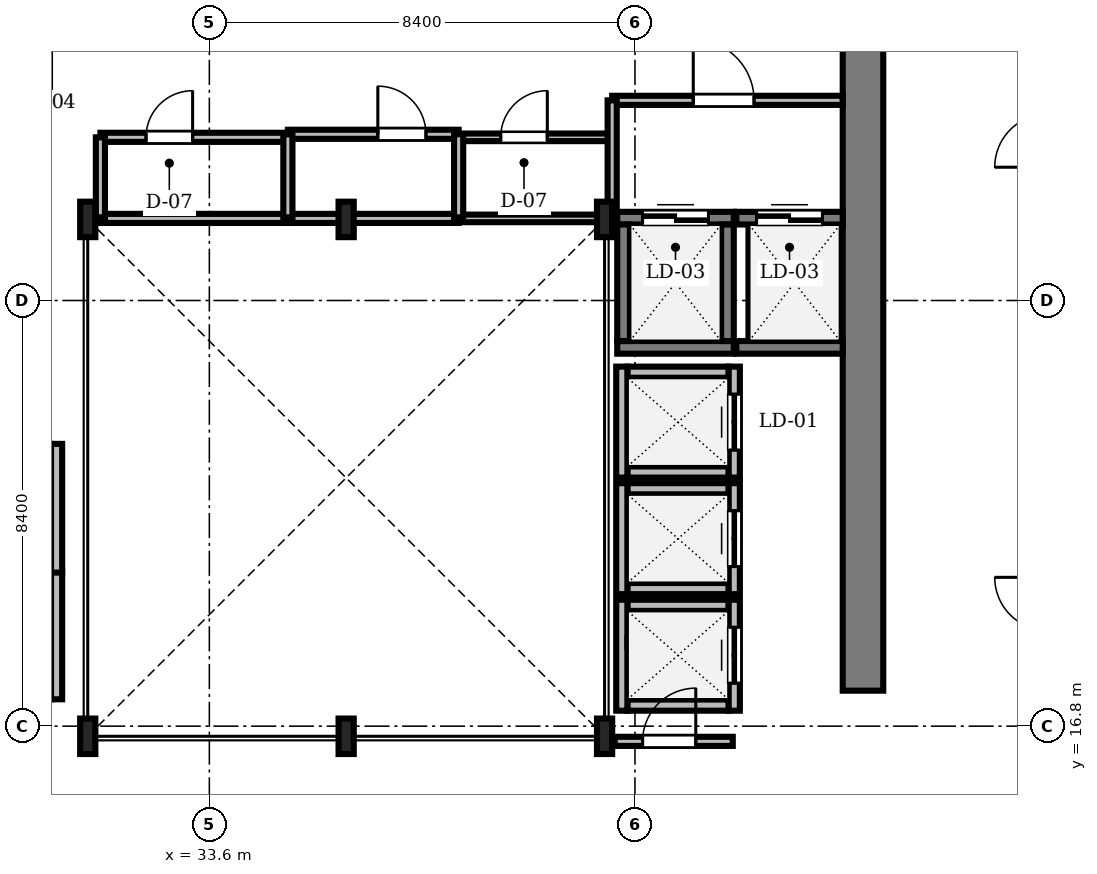
"""IFC4 building model, lengths in metres.
Left out: names, types, materials, properties, quantities, classifications, styles, units other than length and angle.
Written with IfcOpenShell. Run it as: python <this file> out.ifc"""

import sys

from ifc_helpers import new_model, si_unit, direction, frame, frame_2d, origin, origin_2d, place, context, subcontext, project, spatial, rectangle, i_section, extrude, source, transform, mapped, element, fill, save


model = new_model("IFC4")
c1 = context("Model", 3, precision=1e-05, world=origin(), true_north=direction((0.0, 1.0)))
c2 = subcontext(c1, "Body", "Model", "MODEL_VIEW")
j1 = project(units=[si_unit("LENGTHUNIT", "METRE"), si_unit("PLANEANGLEUNIT", "RADIAN")], contexts=[c1])
p1 = place(None, origin())
s1 = spatial("IfcSite", under=j1, at=p1, CompositionType="ELEMENT")
p2 = place(p1, origin())
s2 = spatial("IfcBuilding", under=s1, at=p2, CompositionType="ELEMENT")
p3 = place(p2, frame((0.0, 0.0, 207.3)))
s3 = spatial("IfcBuildingStorey", under=s2, at=p3, CompositionType="ELEMENT", Elevation=207.3)
m1 = source(origin(), c2, "Body", "SweptSolid", [
    extrude(rectangle(XDim=13.15, YDim=0.8, at=frame_2d((6.575, 0.0))), origin(), (0.0, 0.0, 1.0), 3.53),
])
p4 = place(p3, frame((46.5, 17.5, 0.0), z_axis=(0.0, 0.0, 1.0), x_axis=(0.0, 1.0, 0.0)))
e1 = element("IfcWall", 1, at=p4, inside=s3, PredefinedType="SHEAR", context=c2, shape_type="MappedRepresentation", body=[
    mapped(m1, transform((0.0, 0.0, 0.0), scale=1.0)),
])
m2 = source(origin(), c2, "Body", "SweptSolid", [
    extrude(i_section(OverallWidth=0.3, OverallDepth=0.7, WebThickness=0.017, FlangeThickness=0.032, FilletRadius=0.027, at=origin_2d()), origin(), (0.0, 0.0, 1.0), 3.53),
])
for number, where, z_axis, x_axis in (
    (2, (31.2, 16.6, 0.0), (0.0, 0.0, 1.0), (1.0, 0.0, 0.0)),
    (3, (36.3, 16.6, 0.0), (0.0, 0.0, 1.0), (1.0, 0.0, 0.0)),
    (4, (41.4, 16.6, 0.0), (0.0, 0.0, 1.0), (1.0, 0.0, 0.0)),
    (5, (41.4, 26.8, 0.0), (0.0, 0.0, 1.0), (1.0, 0.0, 0.0)),
    (6, (36.3, 26.8, 0.0), (0.0, 0.0, 1.0), (1.0, 0.0, 0.0)),
    (7, (31.2, 26.8, 0.0), (0.0, 0.0, 1.0), (1.0, 0.0, 0.0)),
):
    element("IfcColumn", number, at=place(p3, frame(where, z_axis=z_axis, x_axis=x_axis)), inside=s3, PredefinedType="COLUMN", context=c2, shape_type="MappedRepresentation", body=[
        mapped(m2, transform((0.0, 0.0, 0.0), scale=1.0)),
    ])
m3 = source(origin(), c2, "Body", "SweptSolid", [
    extrude(rectangle(XDim=2.0, YDim=0.22, at=frame_2d((1.0, 0.0))), origin(), (0.0, 0.0, 1.0), 3.53),
])
for number, where, z_axis, x_axis in (
    (8, (41.85, 21.815, 0.0), (0.0, 0.0, 1.0), (1.0, 0.0, 0.0)),
    (9, (41.85, 23.785, 0.0), (0.0, 0.0, 1.0), (1.0, 0.0, 0.0)),
):
    element("IfcWall", number, at=place(p3, frame(where, z_axis=z_axis, x_axis=x_axis)), inside=s3, PredefinedType="SOLIDWALL", context=c2, shape_type="MappedRepresentation", body=[
        mapped(m3, transform((0.0, 0.0, 0.0), scale=1.0)),
    ])
m4 = source(origin(), c2, "Body", "SweptSolid", [
    extrude(rectangle(XDim=2.19, YDim=0.22, at=frame_2d((1.095, 0.0))), origin(), (0.0, 0.0, 1.0), 3.53),
])
p5 = place(p3, frame((41.74, 21.705, 0.0), z_axis=(0.0, 0.0, 1.0), x_axis=(0.0, 1.0, 0.0)))
e10 = element("IfcWall", 10, at=p5, inside=s3, PredefinedType="SOLIDWALL", context=c2, shape_type="MappedRepresentation", body=[
    mapped(m4, transform((0.0, 0.0, 0.0), scale=1.0)),
])
p6 = place(p3, frame((43.96, 21.705, 0.0), z_axis=(0.0, 0.0, 1.0), x_axis=(0.0, 1.0, 0.0)))
e11 = element("IfcWall", 11, at=p6, inside=s3, PredefinedType="SOLIDWALL", context=c2, shape_type="MappedRepresentation", body=[
    mapped(m4, transform((0.0, 0.0, 0.0), scale=1.0)),
])
m5 = source(origin(), c2, "Body", "SweptSolid", [
    extrude(rectangle(XDim=1.1, YDim=2.2, at=frame_2d((0.55, 1.1))), frame((0.0, 0.12, 0.0), z_axis=(0.0, -1.0, 0.0), x_axis=(1.0, 0.0, 0.0)), (0.0, 0.0, 1.0), 0.24),
])
p7 = place(p6, frame((0.545, 0.0, 0.0)))
e12 = element("IfcOpeningElement", 12, at=p7, cuts=e11, PredefinedType="OPENING", context=c2, shape_type="MappedRepresentation", body=[
    mapped(m5, transform((0.0, 0.0, 0.0), scale=1.0)),
])
for number, where, z_axis, x_axis in (
    (13, (41.85, 19.515, 0.0), (0.0, 0.0, 1.0), (1.0, 0.0, 0.0)),
    (14, (41.85, 21.485, 0.0), (0.0, 0.0, 1.0), (1.0, 0.0, 0.0)),
):
    element("IfcWall", number, at=place(p3, frame(where, z_axis=z_axis, x_axis=x_axis)), inside=s3, PredefinedType="SOLIDWALL", context=c2, shape_type="MappedRepresentation", body=[
        mapped(m3, transform((0.0, 0.0, 0.0), scale=1.0)),
    ])
p8 = place(p3, frame((41.74, 19.405, 0.0), z_axis=(0.0, 0.0, 1.0), x_axis=(0.0, 1.0, 0.0)))
e15 = element("IfcWall", 15, at=p8, inside=s3, PredefinedType="SOLIDWALL", context=c2, shape_type="MappedRepresentation", body=[
    mapped(m4, transform((0.0, 0.0, 0.0), scale=1.0)),
])
p9 = place(p3, frame((43.96, 19.405, 0.0), z_axis=(0.0, 0.0, 1.0), x_axis=(0.0, 1.0, 0.0)))
e16 = element("IfcWall", 16, at=p9, inside=s3, PredefinedType="SOLIDWALL", context=c2, shape_type="MappedRepresentation", body=[
    mapped(m4, transform((0.0, 0.0, 0.0), scale=1.0)),
])
p10 = place(p9, frame((0.545, 0.0, 0.0)))
e17 = element("IfcOpeningElement", 17, at=p10, cuts=e16, PredefinedType="OPENING", context=c2, shape_type="MappedRepresentation", body=[
    mapped(m5, transform((0.0, 0.0, 0.0), scale=1.0)),
])
for number, where, z_axis, x_axis in (
    (18, (41.85, 17.215, 0.0), (0.0, 0.0, 1.0), (1.0, 0.0, 0.0)),
    (19, (41.85, 19.185, 0.0), (0.0, 0.0, 1.0), (1.0, 0.0, 0.0)),
):
    element("IfcWall", number, at=place(p3, frame(where, z_axis=z_axis, x_axis=x_axis)), inside=s3, PredefinedType="SOLIDWALL", context=c2, shape_type="MappedRepresentation", body=[
        mapped(m3, transform((0.0, 0.0, 0.0), scale=1.0)),
    ])
p11 = place(p3, frame((41.74, 17.105, 0.0), z_axis=(0.0, 0.0, 1.0), x_axis=(0.0, 1.0, 0.0)))
e20 = element("IfcWall", 20, at=p11, inside=s3, PredefinedType="SOLIDWALL", context=c2, shape_type="MappedRepresentation", body=[
    mapped(m4, transform((0.0, 0.0, 0.0), scale=1.0)),
])
p12 = place(p3, frame((43.96, 17.105, 0.0), z_axis=(0.0, 0.0, 1.0), x_axis=(0.0, 1.0, 0.0)))
e21 = element("IfcWall", 21, at=p12, inside=s3, PredefinedType="SOLIDWALL", context=c2, shape_type="MappedRepresentation", body=[
    mapped(m4, transform((0.0, 0.0, 0.0), scale=1.0)),
])
p13 = place(p12, frame((0.545, 0.0, 0.0)))
e22 = element("IfcOpeningElement", 22, at=p13, cuts=e21, PredefinedType="OPENING", context=c2, shape_type="MappedRepresentation", body=[
    mapped(m5, transform((0.0, 0.0, 0.0), scale=1.0)),
])
m6 = source(origin(), c2, "Body", "SweptSolid", [
    extrude(rectangle(XDim=2.54, YDim=0.22, at=frame_2d((1.27, 0.0))), origin(), (0.0, 0.0, 1.0), 3.53),
])
for number, where, z_axis, x_axis in (
    (23, (30.585, 17.33, 0.0), (0.0, 0.0, 1.0), (0.0, 1.0, 0.0)),
    (24, (30.585, 19.83, 0.0), (0.0, 0.0, 1.0), (0.0, 1.0, 0.0)),
):
    element("IfcWall", number, at=place(p3, frame(where, z_axis=z_axis, x_axis=x_axis)), inside=s3, PredefinedType="SOLIDWALL", context=c2, shape_type="MappedRepresentation", body=[
        mapped(m6, transform((0.0, 0.0, 0.0), scale=1.0)),
    ])
m7 = source(origin(), c2, "Body", "SweptSolid", [
    extrude(rectangle(XDim=2.3, YDim=0.25, at=frame_2d((1.15, 0.0))), origin(), (0.0, 0.0, 1.0), 3.53),
])
p14 = place(p3, frame((41.65, 24.275, 0.0), z_axis=(0.0, 0.0, 1.0), x_axis=(1.0, 0.0, 0.0)))
e25 = element("IfcWall", 25, at=p14, inside=s3, PredefinedType="SOLIDWALL", context=c2, shape_type="MappedRepresentation", body=[
    mapped(m7, transform((0.0, 0.0, 0.0), scale=1.0)),
])
p15 = place(p3, frame((41.65, 26.825, 0.0), z_axis=(0.0, 0.0, 1.0), x_axis=(1.0, 0.0, 0.0)))
e26 = element("IfcWall", 26, at=p15, inside=s3, PredefinedType="SOLIDWALL", context=c2, shape_type="MappedRepresentation", body=[
    mapped(m7, transform((0.0, 0.0, 0.0), scale=1.0)),
])
m8 = source(origin(), c2, "Body", "SweptSolid", [
    extrude(rectangle(XDim=1.3, YDim=2.3, at=frame_2d((0.65, 1.15))), frame((0.0, 0.135, 0.0), z_axis=(0.0, -1.0, 0.0), x_axis=(1.0, 0.0, 0.0)), (0.0, 0.0, 1.0), 0.27),
])
p16 = place(p15, frame((0.5, 0.0, 0.0)))
e27 = element("IfcOpeningElement", 27, at=p16, cuts=e26, PredefinedType="OPENING", context=c2, shape_type="MappedRepresentation", body=[
    mapped(m8, transform((0.0, 0.0, 0.0), scale=1.0)),
])
for number, where, z_axis, x_axis in (
    (28, (41.775, 24.4, 0.0), (0.0, 0.0, 1.0), (0.0, 1.0, 0.0)),
    (29, (43.825, 24.4, 0.0), (0.0, 0.0, 1.0), (0.0, 1.0, 0.0)),
):
    element("IfcWall", number, at=place(p3, frame(where, z_axis=z_axis, x_axis=x_axis)), inside=s3, PredefinedType="SOLIDWALL", context=c2, shape_type="MappedRepresentation", body=[
        mapped(m7, transform((0.0, 0.0, 0.0), scale=1.0)),
    ])
m9 = source(origin(), c2, "Body", "SweptSolid", [
    extrude(rectangle(XDim=2.1, YDim=0.25, at=frame_2d((1.05, 0.0))), origin(), (0.0, 0.0, 1.0), 3.53),
])
p17 = place(p3, frame((44.0, 24.275, 0.0), z_axis=(0.0, 0.0, 1.0), x_axis=(1.0, 0.0, 0.0)))
e30 = element("IfcWall", 30, at=p17, inside=s3, PredefinedType="SOLIDWALL", context=c2, shape_type="MappedRepresentation", body=[
    mapped(m9, transform((0.0, 0.0, 0.0), scale=1.0)),
])
p18 = place(p3, frame((44.0, 26.825, 0.0), z_axis=(0.0, 0.0, 1.0), x_axis=(1.0, 0.0, 0.0)))
e31 = element("IfcWall", 31, at=p18, inside=s3, PredefinedType="SOLIDWALL", context=c2, shape_type="MappedRepresentation", body=[
    mapped(m9, transform((0.0, 0.0, 0.0), scale=1.0)),
])
p19 = place(p18, frame((0.4, 0.0, 0.0)))
e32 = element("IfcOpeningElement", 32, at=p19, cuts=e31, PredefinedType="OPENING", context=c2, shape_type="MappedRepresentation", body=[
    mapped(m8, transform((0.0, 0.0, 0.0), scale=1.0)),
])
m10 = source(origin(), c2, "Body", "SweptSolid", [
    extrude(rectangle(XDim=4.548, YDim=0.18, at=frame_2d((2.274, 0.0))), origin(), (0.0, 0.0, 1.0), 3.162),
])
p20 = place(p3, frame((41.55, 29.15, 0.0), z_axis=(0.0, 0.0, 1.0), x_axis=(1.0, 0.0, 0.0)))
e33 = element("IfcWall", 33, at=p20, inside=s3, PredefinedType="PARTITIONING", context=c2, shape_type="MappedRepresentation", body=[
    mapped(m10, transform((0.0, 0.0, 0.0), scale=1.0)),
])
m11 = source(origin(), c2, "Body", "SweptSolid", [
    extrude(rectangle(XDim=1.2, YDim=2.2, at=frame_2d((0.6, 1.1))), frame((0.0, 0.1, 0.0), z_axis=(0.0, -1.0, 0.0), x_axis=(1.0, 0.0, 0.0)), (0.0, 0.0, 1.0), 0.2),
])
p21 = place(p20, frame((1.6, 0.0, 0.0)))
e34 = element("IfcOpeningElement", 34, at=p21, cuts=e33, PredefinedType="OPENING", context=c2, shape_type="MappedRepresentation", body=[
    mapped(m11, transform((0.0, 0.0, 0.0), scale=1.0)),
])
m12 = source(origin(), c2, "Body", "SweptSolid", [
    extrude(rectangle(XDim=3.7, YDim=0.18, at=frame_2d((1.85, 0.0))), origin(), (0.0, 0.0, 1.0), 3.162),
])
p22 = place(p3, frame((31.45, 28.42, 0.0), z_axis=(0.0, 0.0, 1.0), x_axis=(1.0, 0.0, 0.0)))
e35 = element("IfcWall", 35, at=p22, inside=s3, PredefinedType="PARTITIONING", context=c2, shape_type="MappedRepresentation", body=[
    mapped(m12, transform((0.0, 0.0, 0.0), scale=1.0)),
])
m13 = source(origin(), c2, "Body", "SweptSolid", [
    extrude(rectangle(XDim=0.92, YDim=2.1, at=frame_2d((0.46, 1.05))), frame((0.0, 0.1, 0.0), z_axis=(0.0, -1.0, 0.0), x_axis=(1.0, 0.0, 0.0)), (0.0, 0.0, 1.0), 0.2),
])
p23 = place(p22, frame((0.9, 0.0, 0.0)))
e36 = element("IfcOpeningElement", 36, at=p23, cuts=e35, PredefinedType="OPENING", context=c2, shape_type="MappedRepresentation", body=[
    mapped(m13, transform((0.0, 0.0, 0.0), scale=1.0)),
])
m14 = source(origin(), c2, "Body", "SweptSolid", [
    extrude(rectangle(XDim=3.37, YDim=0.18, at=frame_2d((1.685, 0.0))), origin(), (0.0, 0.0, 1.0), 3.53),
])
p24 = place(p3, frame((35.15, 28.48, 0.0), z_axis=(0.0, 0.0, 1.0), x_axis=(1.0, 0.0, 0.0)))
e37 = element("IfcWall", 37, at=p24, inside=s3, PredefinedType="PARTITIONING", context=c2, shape_type="MappedRepresentation", body=[
    mapped(m14, transform((0.0, 0.0, 0.0), scale=1.0)),
])
m15 = source(origin(), c2, "Body", "SweptSolid", [
    extrude(rectangle(XDim=0.95, YDim=2.15, at=frame_2d((0.475, 1.075))), frame((0.0, 0.1, 0.0), z_axis=(0.0, -1.0, 0.0), x_axis=(1.0, 0.0, 0.0)), (0.0, 0.0, 1.0), 0.2),
])
p25 = place(p24, frame((1.775, 0.0, 0.0)))
e38 = element("IfcOpeningElement", 38, at=p25, cuts=e37, PredefinedType="OPENING", context=c2, shape_type="MappedRepresentation", body=[
    mapped(m15, transform((0.0, 0.0, 0.0), scale=1.0)),
])
m16 = source(origin(), c2, "Body", "SweptSolid", [
    extrude(rectangle(XDim=3.0, YDim=0.15, at=frame_2d((1.5, 0.0))), origin(), (0.0, 0.0, 1.0), 3.53),
])
p26 = place(p3, frame((38.52, 28.42, 0.0), z_axis=(0.0, 0.0, 1.0), x_axis=(1.0, 0.0, 0.0)))
e39 = element("IfcWall", 39, at=p26, inside=s3, PredefinedType="PARTITIONING", context=c2, shape_type="MappedRepresentation", body=[
    mapped(m16, transform((0.0, 0.0, 0.0), scale=1.0)),
])
m17 = source(origin(), c2, "Body", "SweptSolid", [
    extrude(rectangle(XDim=0.92, YDim=2.1, at=frame_2d((0.46, 1.05))), frame((0.0, 0.085, 0.0), z_axis=(0.0, -1.0, 0.0), x_axis=(1.0, 0.0, 0.0)), (0.0, 0.0, 1.0), 0.17),
])
p27 = place(p26, frame((0.83, 0.0, 0.0)))
e40 = element("IfcOpeningElement", 40, at=p27, cuts=e39, PredefinedType="OPENING", context=c2, shape_type="MappedRepresentation", body=[
    mapped(m17, transform((0.0, 0.0, 0.0), scale=1.0)),
])
m18 = source(origin(), c2, "Body", "SweptSolid", [
    extrude(rectangle(XDim=2.33, YDim=0.18, at=frame_2d((1.165, 0.0))), origin(), (0.0, 0.0, 1.0), 2.972),
])
p28 = place(p3, frame((41.6, 16.5, 0.0), z_axis=(0.0, 0.0, 1.0), x_axis=(1.0, 0.0, 0.0)))
e41 = element("IfcWall", 41, at=p28, inside=s3, PredefinedType="PARTITIONING", context=c2, shape_type="MappedRepresentation", body=[
    mapped(m18, transform((0.0, 0.0, 0.0), scale=1.0)),
])
m19 = source(origin(), c2, "Body", "SweptSolid", [
    extrude(rectangle(XDim=1.05, YDim=2.2, at=frame_2d((0.525, 1.1))), frame((0.0, 0.1, 0.0), z_axis=(0.0, -1.0, 0.0), x_axis=(1.0, 0.0, 0.0)), (0.0, 0.0, 1.0), 0.2),
])
p29 = place(p28, frame((0.55, 0.0, 0.0)))
e42 = element("IfcOpeningElement", 42, at=p29, cuts=e41, PredefinedType="OPENING", context=c2, shape_type="MappedRepresentation", body=[
    mapped(m19, transform((0.0, 0.0, 0.0), scale=1.0)),
])
m20 = source(origin(), c2, "Body", "SweptSolid", [
    extrude(rectangle(XDim=3.7, YDim=0.18, at=frame_2d((1.85, 0.0))), origin(), (0.0, 0.0, 1.0), 3.072),
])
p30 = place(p3, frame((31.45, 26.82, 0.0), z_axis=(0.0, 0.0, 1.0), x_axis=(1.0, 0.0, 0.0)))
e43 = element("IfcWall", 43, at=p30, inside=s3, PredefinedType="PARTITIONING", context=c2, shape_type="MappedRepresentation", body=[
    mapped(m20, transform((0.0, 0.0, 0.0), scale=1.0)),
])
m21 = source(origin(), c2, "Body", "SweptSolid", [
    extrude(rectangle(XDim=3.37, YDim=0.18, at=frame_2d((1.685, 0.0))), origin(), (0.0, 0.0, 1.0), 3.072),
])
p31 = place(p3, frame((35.15, 26.82, 0.0), z_axis=(0.0, 0.0, 1.0), x_axis=(1.0, 0.0, 0.0)))
e44 = element("IfcWall", 44, at=p31, inside=s3, PredefinedType="PARTITIONING", context=c2, shape_type="MappedRepresentation", body=[
    mapped(m21, transform((0.0, 0.0, 0.0), scale=1.0)),
])
m22 = source(origin(), c2, "Body", "SweptSolid", [
    extrude(rectangle(XDim=3.0, YDim=0.15, at=frame_2d((1.5, 0.0))), origin(), (0.0, 0.0, 1.0), 2.972),
])
p32 = place(p3, frame((38.52, 26.82, 0.0), z_axis=(0.0, 0.0, 1.0), x_axis=(1.0, 0.0, 0.0)))
e45 = element("IfcWall", 45, at=p32, inside=s3, PredefinedType="PARTITIONING", context=c2, shape_type="MappedRepresentation", body=[
    mapped(m22, transform((0.0, 0.0, 0.0), scale=1.0)),
])
m23 = source(origin(), c2, "Body", "SweptSolid", [
    extrude(rectangle(XDim=2.35, YDim=0.18, at=frame_2d((1.175, 0.0))), origin(), (0.0, 0.0, 1.0), 2.972),
])
p33 = place(p3, frame((41.55, 26.8, 0.0), z_axis=(0.0, 0.0, 1.0), x_axis=(0.0, 1.0, 0.0)))
e46 = element("IfcWall", 46, at=p33, inside=s3, PredefinedType="PARTITIONING", context=c2, shape_type="MappedRepresentation", body=[
    mapped(m23, transform((0.0, 0.0, 0.0), scale=1.0)),
])
m24 = source(origin(), c2, "Body", "SweptSolid", [
    extrude(rectangle(XDim=1.858, YDim=0.18, at=frame_2d((0.929, 0.0))), origin(), (0.0, 0.0, 1.0), 3.53),
])
p34 = place(p3, frame((41.852, 18.45, 0.0), z_axis=(0.0, 0.0, 1.0), x_axis=(1.0, 0.0, 0.0)))
e47 = element("IfcWall", 47, at=p34, inside=s3, PredefinedType="PARTITIONING", context=c2, shape_type="MappedRepresentation", body=[
    mapped(m24, transform((0.0, 0.0, 0.0), scale=1.0)),
])
m25 = source(origin(), c2, "Body", "SweptSolid", [
    extrude(rectangle(XDim=1.66, YDim=0.18, at=frame_2d((0.83, 0.0))), origin(), (0.0, 0.0, 1.0), 3.072),
])
for number, where, z_axis, x_axis in (
    (48, (35.15, 26.82, 0.0), (0.0, 0.0, 1.0), (0.0, 1.0, 0.0)),
    (49, (38.52, 26.82, 0.0), (0.0, 0.0, 1.0), (0.0, 1.0, 0.0)),
):
    element("IfcWall", number, at=place(p3, frame(where, z_axis=z_axis, x_axis=x_axis)), inside=s3, PredefinedType="PARTITIONING", context=c2, shape_type="MappedRepresentation", body=[
        mapped(m25, transform((0.0, 0.0, 0.0), scale=1.0)),
    ])
m26 = source(origin(), c2, "Body", "SweptSolid", [
    extrude(rectangle(XDim=1.6, YDim=0.18, at=frame_2d((0.8, 0.0))), origin(), (0.0, 0.0, 1.0), 3.072),
])
p35 = place(p3, frame((31.45, 26.82, 0.0), z_axis=(0.0, 0.0, 1.0), x_axis=(0.0, 1.0, 0.0)))
e50 = element("IfcWall", 50, at=p35, inside=s3, PredefinedType="PARTITIONING", context=c2, shape_type="MappedRepresentation", body=[
    mapped(m26, transform((0.0, 0.0, 0.0), scale=1.0)),
])
m27 = source(origin(), c2, "Body", "SweptSolid", [
    extrude(rectangle(XDim=1.1, YDim=2.2, at=frame_2d((0.55, 1.1))), frame((0.0, 0.025, 0.0), z_axis=(0.0, -1.0, 0.0), x_axis=(1.0, 0.0, 0.0)), (0.0, 0.0, 1.0), 0.05),
])
p36 = place(p7, origin())
e51 = element("IfcDoor", 51, at=p36, inside=s3, OperationType="DOUBLE_DOOR_SLIDING", PredefinedType="DOOR", context=c2, shape_type="MappedRepresentation", body=[
    mapped(m27, transform((0.0, 0.0, 0.0), scale=1.0)),
])
fill(e12, e51)
p37 = place(p10, origin())
e52 = element("IfcDoor", 52, at=p37, inside=s3, OperationType="DOUBLE_DOOR_SLIDING", PredefinedType="DOOR", context=c2, shape_type="MappedRepresentation", body=[
    mapped(m27, transform((0.0, 0.0, 0.0), scale=1.0)),
])
fill(e17, e52)
p38 = place(p13, origin())
e53 = element("IfcDoor", 53, at=p38, inside=s3, OperationType="DOUBLE_DOOR_SLIDING", PredefinedType="DOOR", context=c2, shape_type="MappedRepresentation", body=[
    mapped(m27, transform((0.0, 0.0, 0.0), scale=1.0)),
])
fill(e22, e53)
m28 = source(origin(), c2, "Body", "SweptSolid", [
    extrude(rectangle(XDim=1.3, YDim=2.3, at=frame_2d((0.65, 1.15))), frame((0.0, 0.025, 0.0), z_axis=(0.0, -1.0, 0.0), x_axis=(1.0, 0.0, 0.0)), (0.0, 0.0, 1.0), 0.05),
])
p39 = place(p16, origin())
e54 = element("IfcDoor", 54, at=p39, inside=s3, OperationType="DOUBLE_DOOR_SLIDING", PredefinedType="DOOR", context=c2, shape_type="MappedRepresentation", body=[
    mapped(m28, transform((0.0, 0.0, 0.0), scale=1.0)),
])
fill(e27, e54)
p40 = place(p19, origin())
e55 = element("IfcDoor", 55, at=p40, inside=s3, OperationType="DOUBLE_DOOR_SLIDING", PredefinedType="DOOR", context=c2, shape_type="MappedRepresentation", body=[
    mapped(m28, transform((0.0, 0.0, 0.0), scale=1.0)),
])
fill(e32, e55)
m29 = source(origin(), c2, "Body", "SweptSolid", [
    extrude(rectangle(XDim=1.2, YDim=2.2, at=frame_2d((0.6, 1.1))), frame((0.0, 0.025, 0.0), z_axis=(0.0, -1.0, 0.0), x_axis=(1.0, 0.0, 0.0)), (0.0, 0.0, 1.0), 0.05),
])
p41 = place(p21, origin())
e56 = element("IfcDoor", 56, at=p41, inside=s3, OperationType="SINGLE_SWING_LEFT", PredefinedType="DOOR", context=c2, shape_type="MappedRepresentation", body=[
    mapped(m29, transform((0.0, 0.0, 0.0), scale=1.0)),
])
fill(e34, e56)
m30 = source(origin(), c2, "Body", "SweptSolid", [
    extrude(rectangle(XDim=0.92, YDim=2.1, at=frame_2d((0.46, 1.05))), frame((0.0, 0.025, 0.0), z_axis=(0.0, -1.0, 0.0), x_axis=(1.0, 0.0, 0.0)), (0.0, 0.0, 1.0), 0.05),
])
p42 = place(p23, origin())
e57 = element("IfcDoor", 57, at=p42, inside=s3, OperationType="SINGLE_SWING_RIGHT", PredefinedType="DOOR", context=c2, shape_type="MappedRepresentation", body=[
    mapped(m30, transform((0.0, 0.0, 0.0), scale=1.0)),
])
fill(e36, e57)
m31 = source(origin(), c2, "Body", "SweptSolid", [
    extrude(rectangle(XDim=0.95, YDim=2.15, at=frame_2d((0.475, 1.075))), frame((0.0, 0.025, 0.0), z_axis=(0.0, -1.0, 0.0), x_axis=(1.0, 0.0, 0.0)), (0.0, 0.0, 1.0), 0.05),
])
p43 = place(p25, origin())
e58 = element("IfcDoor", 58, at=p43, inside=s3, OperationType="SINGLE_SWING_LEFT", PredefinedType="DOOR", context=c2, shape_type="MappedRepresentation", body=[
    mapped(m31, transform((0.0, 0.0, 0.0), scale=1.0)),
])
fill(e38, e58)
p44 = place(p27, origin())
e59 = element("IfcDoor", 59, at=p44, inside=s3, OperationType="SINGLE_SWING_RIGHT", PredefinedType="DOOR", context=c2, shape_type="MappedRepresentation", body=[
    mapped(m30, transform((0.0, 0.0, 0.0), scale=1.0)),
])
fill(e40, e59)
m32 = source(origin(), c2, "Body", "SweptSolid", [
    extrude(rectangle(XDim=1.05, YDim=2.2, at=frame_2d((0.525, 1.1))), frame((0.0, 0.025, 0.0), z_axis=(0.0, -1.0, 0.0), x_axis=(1.0, 0.0, 0.0)), (0.0, 0.0, 1.0), 0.05),
])
p45 = place(p29, origin())
e60 = element("IfcDoor", 60, at=p45, inside=s3, OperationType="SINGLE_SWING_RIGHT", PredefinedType="DOOR", context=c2, shape_type="MappedRepresentation", body=[
    mapped(m32, transform((0.0, 0.0, 0.0), scale=1.0)),
])
fill(e42, e60)
save(model, sys.argv[1])
